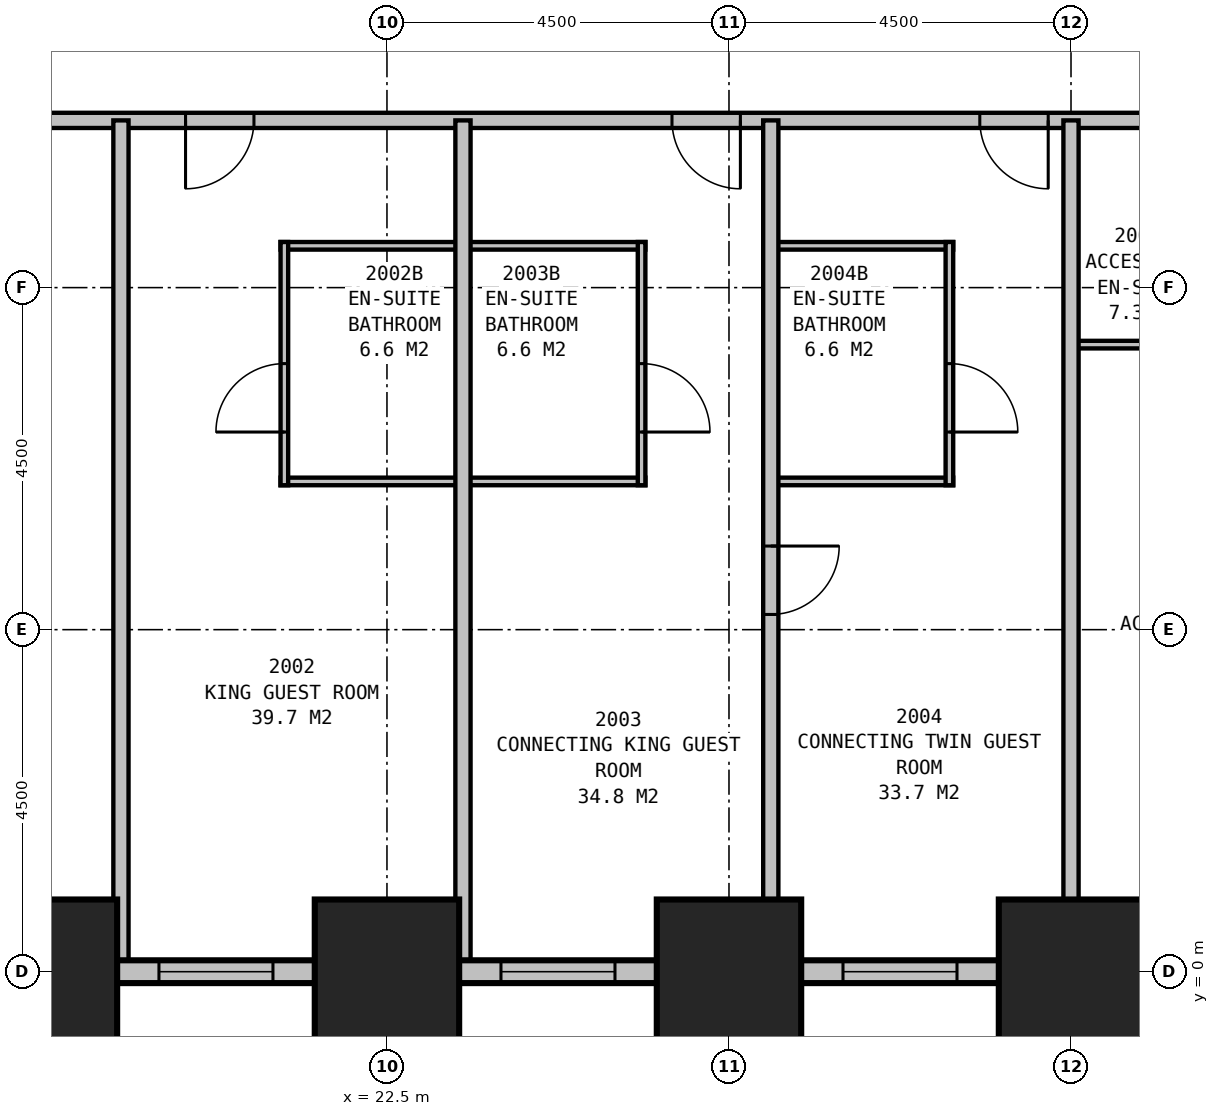
"""IFC4 building model, lengths in metres.
Left out: names, types, materials, properties, quantities, classifications, styles, units other than length and angle.
Written with IfcOpenShell. Run it as: python <this file> out.ifc"""

import sys

from ifc_helpers import new_model, si_unit, direction, frame, frame_2d, origin, origin_2d, place, context, subcontext, project, spatial, rectangle, extrude, element, fill, save


model = new_model("IFC4")
c1 = context("Model", 3, precision=1e-05, world=origin(), true_north=direction((0.0, 1.0)))
c2 = subcontext(c1, "Body", "Model", "MODEL_VIEW")
j1 = project(units=[si_unit("LENGTHUNIT", "METRE"), si_unit("PLANEANGLEUNIT", "RADIAN")], contexts=[c1])
p1 = place(None, origin())
s1 = spatial("IfcSite", under=j1, at=p1, CompositionType="ELEMENT")
p2 = place(p1, origin())
s2 = spatial("IfcBuilding", under=s1, at=p2, CompositionType="ELEMENT")
p3 = place(p2, frame((0.0, 0.0, 82.2)))
s3 = spatial("IfcBuildingStorey", under=s2, at=p3, CompositionType="ELEMENT", Elevation=82.2)
for number, where, z_axis, x_axis in (
    (1, (18.0, 0.0, 0.0), (0.0, 0.0, 1.0), (1.0, 0.0, 0.0)),
    (2, (22.5, 0.0, 0.0), (0.0, 0.0, 1.0), (1.0, 0.0, 0.0)),
    (3, (27.0, 0.0, 0.0), (0.0, 0.0, 1.0), (1.0, 0.0, 0.0)),
    (4, (31.5, 0.0, 0.0), (0.0, 0.0, 1.0), (1.0, 0.0, 0.0)),
):
    element("IfcColumn", number, at=place(p3, frame(where, z_axis=z_axis, x_axis=x_axis)), inside=s3, PredefinedType="COLUMN", context=c2, shape_type="SweptSolid", body=[
        extrude(rectangle(XDim=1.9, YDim=1.9, at=origin_2d()), origin(), (0.0, 0.0, 1.0), 3.5),
    ])
p4 = place(p3, frame((4.35, 0.0, 0.0), z_axis=(0.0, 0.0, 1.0), x_axis=(1.0, 0.0, 0.0)))
e5 = element("IfcWall", 5, at=p4, inside=s3, PredefinedType="STANDARD", context=c2, shape_type="SweptSolid", body=[
    extrude(rectangle(XDim=40.8, YDim=0.3, at=frame_2d((20.4, 0.0))), origin(), (0.0, 0.0, 1.0), 2.1),
])
p5 = place(p4, frame((1.65, 0.0, 0.5)))
e6 = element("IfcOpeningElement", 6, at=p5, cuts=e5, PredefinedType="OPENING", context=c2, shape_type="SweptSolid", body=[
    extrude(rectangle(XDim=1.5, YDim=1.4, at=frame_2d((0.75, 0.7))), frame((0.0, 0.16, 0.0), z_axis=(0.0, -1.0, 0.0), x_axis=(1.0, 0.0, 0.0)), (0.0, 0.0, 1.0), 0.32),
])
p6 = place(p4, frame((6.15, 0.0, 0.5)))
e7 = element("IfcOpeningElement", 7, at=p6, cuts=e5, PredefinedType="OPENING", context=c2, shape_type="SweptSolid", body=[
    extrude(rectangle(XDim=1.5, YDim=1.4, at=frame_2d((0.75, 0.7))), frame((0.0, 0.16, 0.0), z_axis=(0.0, -1.0, 0.0), x_axis=(1.0, 0.0, 0.0)), (0.0, 0.0, 1.0), 0.32),
])
p7 = place(p4, frame((10.65, 0.0, 0.5)))
e8 = element("IfcOpeningElement", 8, at=p7, cuts=e5, PredefinedType="OPENING", context=c2, shape_type="SweptSolid", body=[
    extrude(rectangle(XDim=1.5, YDim=1.4, at=frame_2d((0.75, 0.7))), frame((0.0, 0.16, 0.0), z_axis=(0.0, -1.0, 0.0), x_axis=(1.0, 0.0, 0.0)), (0.0, 0.0, 1.0), 0.32),
])
p8 = place(p4, frame((15.15, 0.0, 0.5)))
e9 = element("IfcOpeningElement", 9, at=p8, cuts=e5, PredefinedType="OPENING", context=c2, shape_type="SweptSolid", body=[
    extrude(rectangle(XDim=1.5, YDim=1.4, at=frame_2d((0.75, 0.7))), frame((0.0, 0.16, 0.0), z_axis=(0.0, -1.0, 0.0), x_axis=(1.0, 0.0, 0.0)), (0.0, 0.0, 1.0), 0.32),
])
p9 = place(p4, frame((19.65, 0.0, 0.5)))
e10 = element("IfcOpeningElement", 10, at=p9, cuts=e5, PredefinedType="OPENING", context=c2, shape_type="SweptSolid", body=[
    extrude(rectangle(XDim=1.5, YDim=1.4, at=frame_2d((0.75, 0.7))), frame((0.0, 0.16, 0.0), z_axis=(0.0, -1.0, 0.0), x_axis=(1.0, 0.0, 0.0)), (0.0, 0.0, 1.0), 0.32),
])
p10 = place(p4, frame((24.15, 0.0, 0.5)))
e11 = element("IfcOpeningElement", 11, at=p10, cuts=e5, PredefinedType="OPENING", context=c2, shape_type="SweptSolid", body=[
    extrude(rectangle(XDim=1.5, YDim=1.4, at=frame_2d((0.75, 0.7))), frame((0.0, 0.16, 0.0), z_axis=(0.0, -1.0, 0.0), x_axis=(1.0, 0.0, 0.0)), (0.0, 0.0, 1.0), 0.32),
])
p11 = place(p4, frame((28.65, 0.0, 0.5)))
e12 = element("IfcOpeningElement", 12, at=p11, cuts=e5, PredefinedType="OPENING", context=c2, shape_type="SweptSolid", body=[
    extrude(rectangle(XDim=1.5, YDim=1.4, at=frame_2d((0.75, 0.7))), frame((0.0, 0.16, 0.0), z_axis=(0.0, -1.0, 0.0), x_axis=(1.0, 0.0, 0.0)), (0.0, 0.0, 1.0), 0.32),
])
p12 = place(p4, frame((33.15, 0.0, 0.5)))
e13 = element("IfcOpeningElement", 13, at=p12, cuts=e5, PredefinedType="OPENING", context=c2, shape_type="SweptSolid", body=[
    extrude(rectangle(XDim=1.5, YDim=1.4, at=frame_2d((0.75, 0.7))), frame((0.0, 0.16, 0.0), z_axis=(0.0, -1.0, 0.0), x_axis=(1.0, 0.0, 0.0)), (0.0, 0.0, 1.0), 0.32),
])
p13 = place(p4, frame((37.65, 0.0, 0.5)))
e14 = element("IfcOpeningElement", 14, at=p13, cuts=e5, PredefinedType="OPENING", context=c2, shape_type="SweptSolid", body=[
    extrude(rectangle(XDim=1.5, YDim=1.4, at=frame_2d((0.75, 0.7))), frame((0.0, 0.16, 0.0), z_axis=(0.0, -1.0, 0.0), x_axis=(1.0, 0.0, 0.0)), (0.0, 0.0, 1.0), 0.32),
])
p14 = place(p3, frame((11.2, 11.2, 0.0), z_axis=(0.0, 0.0, 1.0), x_axis=(1.0, 0.0, 0.0)))
e15 = element("IfcWall", 15, at=p14, inside=s3, PredefinedType="PARTITIONING", context=c2, shape_type="SweptSolid", body=[
    extrude(rectangle(XDim=27.1, YDim=0.2, at=frame_2d((13.55, 0.0))), origin(), (0.0, 0.0, 1.0), 3.25),
])
p15 = place(p14, frame((6.45, 0.0, 0.0), z_axis=(0.0, 0.0, 1.0), x_axis=(-1.0, 0.0, 0.0)))
e16 = element("IfcOpeningElement", 16, at=p15, cuts=e15, PredefinedType="OPENING", context=c2, shape_type="SweptSolid", body=[
    extrude(rectangle(XDim=1.0, YDim=2.1, at=frame_2d((0.5, 1.05))), frame((0.0, 0.11, 0.0), z_axis=(0.0, -1.0, 0.0), x_axis=(1.0, 0.0, 0.0)), (0.0, 0.0, 1.0), 0.22),
])
p16 = place(p14, frame((9.55, 0.0, 0.0), z_axis=(0.0, 0.0, 1.0), x_axis=(-1.0, 0.0, 0.0)))
e17 = element("IfcOpeningElement", 17, at=p16, cuts=e15, PredefinedType="OPENING", context=c2, shape_type="SweptSolid", body=[
    extrude(rectangle(XDim=0.9, YDim=2.1, at=frame_2d((0.45, 1.05))), frame((0.0, 0.11, 0.0), z_axis=(0.0, -1.0, 0.0), x_axis=(1.0, 0.0, 0.0)), (0.0, 0.0, 1.0), 0.22),
])
p17 = place(p14, frame((15.95, 0.0, 0.0), z_axis=(0.0, 0.0, 1.0), x_axis=(-1.0, 0.0, 0.0)))
e18 = element("IfcOpeningElement", 18, at=p17, cuts=e15, PredefinedType="OPENING", context=c2, shape_type="SweptSolid", body=[
    extrude(rectangle(XDim=0.9, YDim=2.1, at=frame_2d((0.45, 1.05))), frame((0.0, 0.11, 0.0), z_axis=(0.0, -1.0, 0.0), x_axis=(1.0, 0.0, 0.0)), (0.0, 0.0, 1.0), 0.22),
])
p18 = place(p14, frame((20.0, 0.0, 0.0), z_axis=(0.0, 0.0, 1.0), x_axis=(-1.0, 0.0, 0.0)))
e19 = element("IfcOpeningElement", 19, at=p18, cuts=e15, PredefinedType="OPENING", context=c2, shape_type="SweptSolid", body=[
    extrude(rectangle(XDim=0.9, YDim=2.1, at=frame_2d((0.45, 1.05))), frame((0.0, 0.11, 0.0), z_axis=(0.0, -1.0, 0.0), x_axis=(1.0, 0.0, 0.0)), (0.0, 0.0, 1.0), 0.22),
])
p19 = place(p14, frame((24.45, 0.0, 0.0), z_axis=(0.0, 0.0, 1.0), x_axis=(-1.0, 0.0, 0.0)))
e20 = element("IfcOpeningElement", 20, at=p19, cuts=e15, PredefinedType="OPENING", context=c2, shape_type="SweptSolid", body=[
    extrude(rectangle(XDim=1.0, YDim=2.1, at=frame_2d((0.5, 1.05))), frame((0.0, 0.11, 0.0), z_axis=(0.0, -1.0, 0.0), x_axis=(1.0, 0.0, 0.0)), (0.0, 0.0, 1.0), 0.22),
])
p20 = place(p14, frame((1.6, 0.0, 0.0), z_axis=(0.0, 0.0, 1.0), x_axis=(-1.0, 0.0, 0.0)))
e21 = element("IfcOpeningElement", 21, at=p20, cuts=e15, PredefinedType="OPENING", context=c2, shape_type="SweptSolid", body=[
    extrude(rectangle(XDim=0.9, YDim=2.1, at=frame_2d((0.45, 1.05))), frame((0.0, 0.11, 0.0), z_axis=(0.0, -1.0, 0.0), x_axis=(1.0, 0.0, 0.0)), (0.0, 0.0, 1.0), 0.22),
])
p21 = place(p14, frame((26.4, 0.0, 0.0), z_axis=(0.0, 0.0, 1.0), x_axis=(-1.0, 0.0, 0.0)))
e22 = element("IfcOpeningElement", 22, at=p21, cuts=e15, PredefinedType="OPENING", context=c2, shape_type="SweptSolid", body=[
    extrude(rectangle(XDim=0.9, YDim=2.1, at=frame_2d((0.45, 1.05))), frame((0.0, 0.11, 0.0), z_axis=(0.0, -1.0, 0.0), x_axis=(1.0, 0.0, 0.0)), (0.0, 0.0, 1.0), 0.22),
])
for number, where, z_axis, x_axis in (
    (23, (19.0, 11.2, 0.0), (0.0, 0.0, 1.0), (0.0, -1.0, 0.0)),
    (24, (23.5, 11.2, 0.0), (0.0, 0.0, 1.0), (0.0, -1.0, 0.0)),
):
    element("IfcWall", number, at=place(p3, frame(where, z_axis=z_axis, x_axis=x_axis)), inside=s3, PredefinedType="PARTITIONING", context=c2, shape_type="SweptSolid", body=[
        extrude(rectangle(XDim=11.2, YDim=0.2, at=frame_2d((5.6, 0.0))), origin(), (0.0, 0.0, 1.0), 3.25),
    ])
p22 = place(p3, frame((27.55, 11.2, 0.0), z_axis=(0.0, 0.0, 1.0), x_axis=(0.0, -1.0, 0.0)))
e25 = element("IfcWall", 25, at=p22, inside=s3, PredefinedType="PARTITIONING", context=c2, shape_type="SweptSolid", body=[
    extrude(rectangle(XDim=11.2, YDim=0.2, at=frame_2d((5.6, 0.0))), origin(), (0.0, 0.0, 1.0), 2.2),
])
p23 = place(p22, frame((5.6, 0.0, 0.0)))
e26 = element("IfcOpeningElement", 26, at=p23, cuts=e25, PredefinedType="OPENING", context=c2, shape_type="SweptSolid", body=[
    extrude(rectangle(XDim=0.9, YDim=2.1, at=frame_2d((0.45, 1.05))), frame((0.0, 0.11, 0.0), z_axis=(0.0, -1.0, 0.0), x_axis=(1.0, 0.0, 0.0)), (0.0, 0.0, 1.0), 0.22),
])
p24 = place(p3, frame((31.5, 11.2, 0.0), z_axis=(0.0, 0.0, 1.0), x_axis=(0.0, -1.0, 0.0)))
e27 = element("IfcWall", 27, at=p24, inside=s3, PredefinedType="PARTITIONING", context=c2, shape_type="SweptSolid", body=[
    extrude(rectangle(XDim=11.2, YDim=0.2, at=frame_2d((5.6, 0.0))), origin(), (0.0, 0.0, 1.0), 2.2),
])
for number, where, z_axis, x_axis in (
    (28, (21.1, 9.55, 0.0), (0.0, 0.0, 1.0), (1.0, 0.0, 0.0)),
    (29, (21.1, 6.45, 0.0), (0.0, 0.0, 1.0), (1.0, 0.0, 0.0)),
):
    element("IfcWall", number, at=place(p3, frame(where, z_axis=z_axis, x_axis=x_axis)), inside=s3, PredefinedType="PLUMBINGWALL", context=c2, shape_type="SweptSolid", body=[
        extrude(rectangle(XDim=2.4, YDim=0.1, at=frame_2d((1.2, 0.0))), origin(), (0.0, 0.0, 1.0), 3.25),
    ])
p25 = place(p3, frame((21.15, 9.6, 0.0), z_axis=(0.0, 0.0, 1.0), x_axis=(0.0, -1.0, 0.0)))
e30 = element("IfcWall", 30, at=p25, inside=s3, PredefinedType="PLUMBINGWALL", context=c2, shape_type="SweptSolid", body=[
    extrude(rectangle(XDim=3.2, YDim=0.1, at=frame_2d((1.6, 0.0))), origin(), (0.0, 0.0, 1.0), 3.25),
])
p26 = place(p25, frame((2.5, 0.0, 0.0), z_axis=(0.0, 0.0, 1.0), x_axis=(-1.0, 0.0, 0.0)))
e31 = element("IfcOpeningElement", 31, at=p26, cuts=e30, PredefinedType="OPENING", context=c2, shape_type="SweptSolid", body=[
    extrude(rectangle(XDim=0.9, YDim=2.1, at=frame_2d((0.45, 1.05))), frame((0.0, 0.06, 0.0), z_axis=(0.0, -1.0, 0.0), x_axis=(1.0, 0.0, 0.0)), (0.0, 0.0, 1.0), 0.12),
])
for number, where, z_axis, x_axis in (
    (32, (23.5, 9.55, 0.0), (0.0, 0.0, 1.0), (1.0, 0.0, 0.0)),
    (33, (23.5, 6.45, 0.0), (0.0, 0.0, 1.0), (1.0, 0.0, 0.0)),
):
    element("IfcWall", number, at=place(p3, frame(where, z_axis=z_axis, x_axis=x_axis)), inside=s3, PredefinedType="PLUMBINGWALL", context=c2, shape_type="SweptSolid", body=[
        extrude(rectangle(XDim=2.4, YDim=0.1, at=frame_2d((1.2, 0.0))), origin(), (0.0, 0.0, 1.0), 3.25),
    ])
p27 = place(p3, frame((25.85, 9.6, 0.0), z_axis=(0.0, 0.0, 1.0), x_axis=(0.0, -1.0, 0.0)))
e34 = element("IfcWall", 34, at=p27, inside=s3, PredefinedType="PLUMBINGWALL", context=c2, shape_type="SweptSolid", body=[
    extrude(rectangle(XDim=3.2, YDim=0.1, at=frame_2d((1.6, 0.0))), origin(), (0.0, 0.0, 1.0), 3.25),
])
p28 = place(p27, frame((1.6, 0.0, 0.0)))
e35 = element("IfcOpeningElement", 35, at=p28, cuts=e34, PredefinedType="OPENING", context=c2, shape_type="SweptSolid", body=[
    extrude(rectangle(XDim=0.9, YDim=2.1, at=frame_2d((0.45, 1.05))), frame((0.0, 0.06, 0.0), z_axis=(0.0, -1.0, 0.0), x_axis=(1.0, 0.0, 0.0)), (0.0, 0.0, 1.0), 0.12),
])
for number, where, z_axis, x_axis in (
    (36, (27.55, 9.55, 0.0), (0.0, 0.0, 1.0), (1.0, 0.0, 0.0)),
    (37, (27.55, 6.45, 0.0), (0.0, 0.0, 1.0), (1.0, 0.0, 0.0)),
):
    element("IfcWall", number, at=place(p3, frame(where, z_axis=z_axis, x_axis=x_axis)), inside=s3, PredefinedType="PLUMBINGWALL", context=c2, shape_type="SweptSolid", body=[
        extrude(rectangle(XDim=2.4, YDim=0.1, at=frame_2d((1.2, 0.0))), origin(), (0.0, 0.0, 1.0), 3.25),
    ])
p29 = place(p3, frame((29.9, 9.6, 0.0), z_axis=(0.0, 0.0, 1.0), x_axis=(0.0, -1.0, 0.0)))
e38 = element("IfcWall", 38, at=p29, inside=s3, PredefinedType="PLUMBINGWALL", context=c2, shape_type="SweptSolid", body=[
    extrude(rectangle(XDim=3.2, YDim=0.1, at=frame_2d((1.6, 0.0))), origin(), (0.0, 0.0, 1.0), 3.25),
])
p30 = place(p29, frame((1.6, 0.0, 0.0)))
e39 = element("IfcOpeningElement", 39, at=p30, cuts=e38, PredefinedType="OPENING", context=c2, shape_type="SweptSolid", body=[
    extrude(rectangle(XDim=0.9, YDim=2.1, at=frame_2d((0.45, 1.05))), frame((0.0, 0.06, 0.0), z_axis=(0.0, -1.0, 0.0), x_axis=(1.0, 0.0, 0.0)), (0.0, 0.0, 1.0), 0.12),
])
p31 = place(p3, frame((31.5, 8.25, 0.0), z_axis=(0.0, 0.0, 1.0), x_axis=(1.0, 0.0, 0.0)))
e40 = element("IfcWall", 40, at=p31, inside=s3, PredefinedType="PLUMBINGWALL", context=c2, shape_type="SweptSolid", body=[
    extrude(rectangle(XDim=2.8, YDim=0.1, at=frame_2d((1.4, 0.0))), origin(), (0.0, 0.0, 1.0), 3.25),
])
p32 = place(p8, origin())
e41 = element("IfcWindow", 41, at=p32, inside=s3, PartitioningType="SINGLE_PANEL", PredefinedType="WINDOW", context=c2, shape_type="SweptSolid", body=[
    extrude(rectangle(XDim=1.5, YDim=1.4, at=frame_2d((0.75, 0.7))), frame((0.0, 0.03, 0.0), z_axis=(0.0, -1.0, 0.0), x_axis=(1.0, 0.0, 0.0)), (0.0, 0.0, 1.0), 0.06),
])
fill(e9, e41)
p33 = place(p9, origin())
e42 = element("IfcWindow", 42, at=p33, inside=s3, PartitioningType="SINGLE_PANEL", PredefinedType="WINDOW", context=c2, shape_type="SweptSolid", body=[
    extrude(rectangle(XDim=1.5, YDim=1.4, at=frame_2d((0.75, 0.7))), frame((0.0, 0.03, 0.0), z_axis=(0.0, -1.0, 0.0), x_axis=(1.0, 0.0, 0.0)), (0.0, 0.0, 1.0), 0.06),
])
fill(e10, e42)
p34 = place(p10, origin())
e43 = element("IfcWindow", 43, at=p34, inside=s3, PartitioningType="SINGLE_PANEL", PredefinedType="WINDOW", context=c2, shape_type="SweptSolid", body=[
    extrude(rectangle(XDim=1.5, YDim=1.4, at=frame_2d((0.75, 0.7))), frame((0.0, 0.03, 0.0), z_axis=(0.0, -1.0, 0.0), x_axis=(1.0, 0.0, 0.0)), (0.0, 0.0, 1.0), 0.06),
])
fill(e11, e43)
p35 = place(p16, origin())
e44 = element("IfcDoor", 44, at=p35, inside=s3, OperationType="SINGLE_SWING_RIGHT", PredefinedType="DOOR", context=c2, shape_type="SweptSolid", body=[
    extrude(rectangle(XDim=0.9, YDim=2.1, at=frame_2d((0.45, 1.05))), frame((0.0, 0.025, 0.0), z_axis=(0.0, -1.0, 0.0), x_axis=(1.0, 0.0, 0.0)), (0.0, 0.0, 1.0), 0.05),
])
fill(e17, e44)
p36 = place(p17, origin())
e45 = element("IfcDoor", 45, at=p36, inside=s3, OperationType="SINGLE_SWING_LEFT", PredefinedType="DOOR", context=c2, shape_type="SweptSolid", body=[
    extrude(rectangle(XDim=0.9, YDim=2.1, at=frame_2d((0.45, 1.05))), frame((0.0, 0.025, 0.0), z_axis=(0.0, -1.0, 0.0), x_axis=(1.0, 0.0, 0.0)), (0.0, 0.0, 1.0), 0.05),
])
fill(e18, e45)
p37 = place(p18, origin())
e46 = element("IfcDoor", 46, at=p37, inside=s3, OperationType="SINGLE_SWING_LEFT", PredefinedType="DOOR", context=c2, shape_type="SweptSolid", body=[
    extrude(rectangle(XDim=0.9, YDim=2.1, at=frame_2d((0.45, 1.05))), frame((0.0, 0.025, 0.0), z_axis=(0.0, -1.0, 0.0), x_axis=(1.0, 0.0, 0.0)), (0.0, 0.0, 1.0), 0.05),
])
fill(e19, e46)
p38 = place(p23, origin())
e47 = element("IfcDoor", 47, at=p38, inside=s3, OperationType="SINGLE_SWING_LEFT", PredefinedType="DOOR", context=c2, shape_type="SweptSolid", body=[
    extrude(rectangle(XDim=0.9, YDim=2.1, at=frame_2d((0.45, 1.05))), frame((0.0, 0.025, 0.0), z_axis=(0.0, -1.0, 0.0), x_axis=(1.0, 0.0, 0.0)), (0.0, 0.0, 1.0), 0.05),
])
fill(e26, e47)
p39 = place(p26, origin())
e48 = element("IfcDoor", 48, at=p39, inside=s3, OperationType="SINGLE_SWING_LEFT", PredefinedType="DOOR", context=c2, shape_type="SweptSolid", body=[
    extrude(rectangle(XDim=0.9, YDim=2.1, at=frame_2d((0.45, 1.05))), frame((0.0, 0.025, 0.0), z_axis=(0.0, -1.0, 0.0), x_axis=(1.0, 0.0, 0.0)), (0.0, 0.0, 1.0), 0.05),
])
fill(e31, e48)
p40 = place(p28, origin())
e49 = element("IfcDoor", 49, at=p40, inside=s3, OperationType="SINGLE_SWING_RIGHT", PredefinedType="DOOR", context=c2, shape_type="SweptSolid", body=[
    extrude(rectangle(XDim=0.9, YDim=2.1, at=frame_2d((0.45, 1.05))), frame((0.0, 0.025, 0.0), z_axis=(0.0, -1.0, 0.0), x_axis=(1.0, 0.0, 0.0)), (0.0, 0.0, 1.0), 0.05),
])
fill(e35, e49)
p41 = place(p30, origin())
e50 = element("IfcDoor", 50, at=p41, inside=s3, OperationType="SINGLE_SWING_RIGHT", PredefinedType="DOOR", context=c2, shape_type="SweptSolid", body=[
    extrude(rectangle(XDim=0.9, YDim=2.1, at=frame_2d((0.45, 1.05))), frame((0.0, 0.025, 0.0), z_axis=(0.0, -1.0, 0.0), x_axis=(1.0, 0.0, 0.0)), (0.0, 0.0, 1.0), 0.05),
])
fill(e39, e50)
save(model, sys.argv[1])
